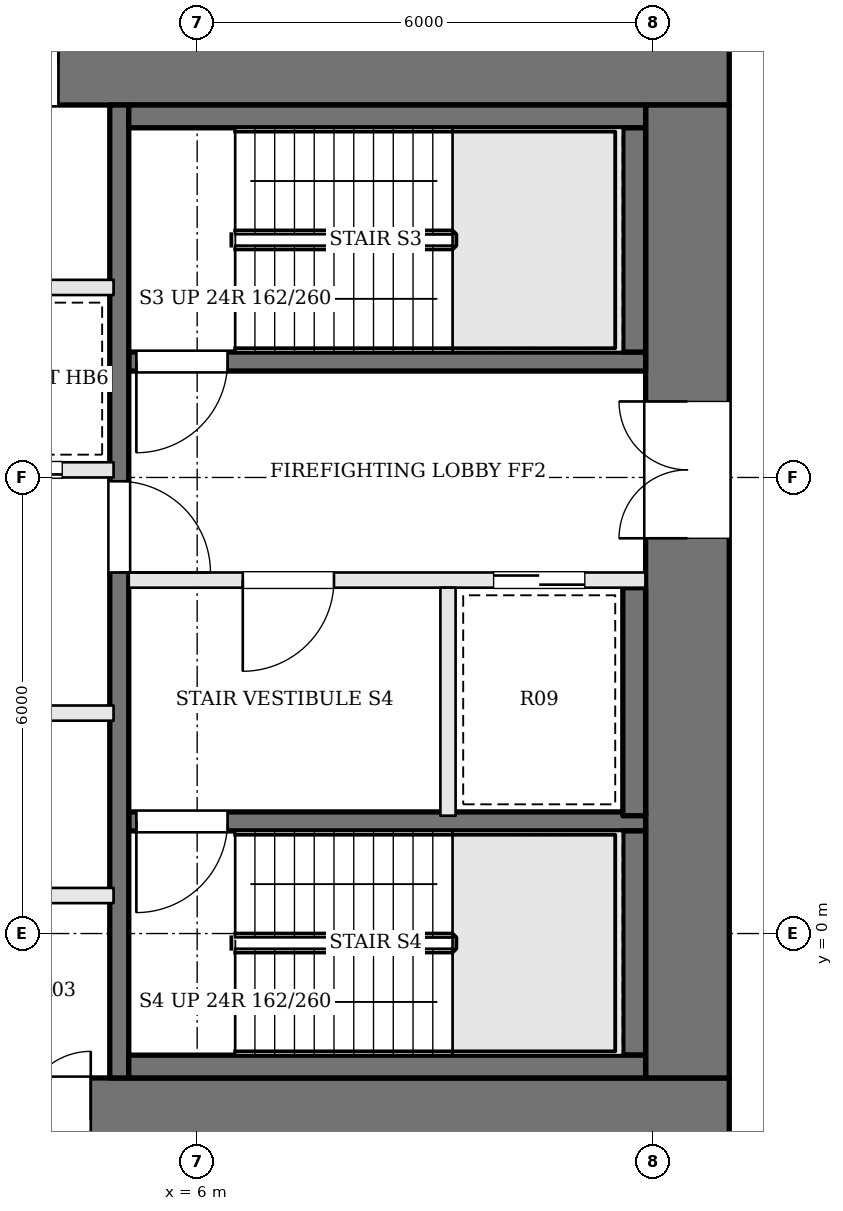
"""IFC4 building model, lengths in metres.
Left out: names, types, materials, properties, quantities, classifications, styles, units other than length and angle.
Written with IfcOpenShell. Run it as: python <this file> out.ifc"""

import sys

from ifc_helpers import new_model, si_unit, direction, frame, frame_2d, origin, place, context, subcontext, project, spatial, rectangle, extrude, element, fill, save


model = new_model("IFC4")
c1 = context("Model", 3, precision=1e-05, world=origin(), true_north=direction((0.0, 1.0)))
c2 = subcontext(c1, "Body", "Model", "MODEL_VIEW")
j1 = project(units=[si_unit("LENGTHUNIT", "METRE"), si_unit("PLANEANGLEUNIT", "RADIAN")], contexts=[c1])
p1 = place(None, origin())
s1 = spatial("IfcSite", under=j1, at=p1, CompositionType="ELEMENT")
p2 = place(p1, origin())
s2 = spatial("IfcBuilding", under=s1, at=p2, CompositionType="ELEMENT")
p3 = place(p2, frame((0.0, 0.0, 142.2)))
s3 = spatial("IfcBuildingStorey", under=s2, at=p3, CompositionType="ELEMENT", Elevation=142.2)
p4 = place(p3, frame((-13.0, 11.45, 0.0), z_axis=(0.0, 0.0, 1.0), x_axis=(1.0, 0.0, 0.0)))
e1 = element("IfcWall", 1, at=p4, inside=s3, PredefinedType="SHEAR", context=c2, shape_type="SweptSolid", body=[
    extrude(rectangle(XDim=26.0, YDim=1.1, at=frame_2d((13.0, 0.0))), origin(), (0.0, 0.0, 1.0), 3.9),
])
p5 = place(p4, frame((8.975, 0.0, 0.0)))
e2 = element("IfcOpeningElement", 2, at=p5, cuts=e1, PredefinedType="OPENING", context=c2, shape_type="SweptSolid", body=[
    extrude(rectangle(XDim=0.7, YDim=2.1, at=frame_2d((0.35, 1.05))), frame((0.0, 0.56, 0.0), z_axis=(0.0, -1.0, 0.0), x_axis=(1.0, 0.0, 0.0)), (0.0, 0.0, 1.0), 1.12),
])
p6 = place(p4, frame((11.425, 0.0, 0.0)))
e3 = element("IfcOpeningElement", 3, at=p6, cuts=e1, PredefinedType="OPENING", context=c2, shape_type="SweptSolid", body=[
    extrude(rectangle(XDim=0.7, YDim=2.1, at=frame_2d((0.35, 1.05))), frame((0.0, 0.56, 0.0), z_axis=(0.0, -1.0, 0.0), x_axis=(1.0, 0.0, 0.0)), (0.0, 0.0, 1.0), 1.12),
])
p7 = place(p4, frame((13.725, 0.0, 0.0)))
e4 = element("IfcOpeningElement", 4, at=p7, cuts=e1, PredefinedType="OPENING", context=c2, shape_type="SweptSolid", body=[
    extrude(rectangle(XDim=1.0, YDim=2.1, at=frame_2d((0.5, 1.05))), frame((0.0, 0.56, 0.0), z_axis=(0.0, -1.0, 0.0), x_axis=(1.0, 0.0, 0.0)), (0.0, 0.0, 1.0), 1.12),
])
p8 = place(p4, frame((16.175, 0.0, 0.0)))
e5 = element("IfcOpeningElement", 5, at=p8, cuts=e1, PredefinedType="OPENING", context=c2, shape_type="SweptSolid", body=[
    extrude(rectangle(XDim=1.0, YDim=2.1, at=frame_2d((0.5, 1.05))), frame((0.0, 0.56, 0.0), z_axis=(0.0, -1.0, 0.0), x_axis=(1.0, 0.0, 0.0)), (0.0, 0.0, 1.0), 1.12),
])
p9 = place(p3, frame((-13.0, -2.45, 0.0), z_axis=(0.0, 0.0, 1.0), x_axis=(1.0, 0.0, 0.0)))
e6 = element("IfcWall", 6, at=p9, inside=s3, PredefinedType="SHEAR", context=c2, shape_type="SweptSolid", body=[
    extrude(rectangle(XDim=26.0, YDim=1.1, at=frame_2d((13.0, 0.0))), origin(), (0.0, 0.0, 1.0), 3.9),
])
p10 = place(p9, frame((9.275, 0.0, 0.0)))
e7 = element("IfcOpeningElement", 7, at=p10, cuts=e6, PredefinedType="OPENING", context=c2, shape_type="SweptSolid", body=[
    extrude(rectangle(XDim=0.9, YDim=2.1, at=frame_2d((0.45, 1.05))), frame((0.0, 0.56, 0.0), z_axis=(0.0, -1.0, 0.0), x_axis=(1.0, 0.0, 0.0)), (0.0, 0.0, 1.0), 1.12),
])
p11 = place(p9, frame((11.75, 0.0, 0.0)))
e8 = element("IfcOpeningElement", 8, at=p11, cuts=e6, PredefinedType="OPENING", context=c2, shape_type="SweptSolid", body=[
    extrude(rectangle(XDim=1.0, YDim=2.1, at=frame_2d((0.5, 1.05))), frame((0.0, 0.56, 0.0), z_axis=(0.0, -1.0, 0.0), x_axis=(1.0, 0.0, 0.0)), (0.0, 0.0, 1.0), 1.12),
])
p12 = place(p9, frame((14.325, 0.0, 0.0)))
e9 = element("IfcOpeningElement", 9, at=p12, cuts=e6, PredefinedType="OPENING", context=c2, shape_type="SweptSolid", body=[
    extrude(rectangle(XDim=0.9, YDim=2.1, at=frame_2d((0.45, 1.05))), frame((0.0, 0.56, 0.0), z_axis=(0.0, -1.0, 0.0), x_axis=(1.0, 0.0, 0.0)), (0.0, 0.0, 1.0), 1.12),
])
p13 = place(p9, frame((16.7, 0.0, 0.0)))
e10 = element("IfcOpeningElement", 10, at=p13, cuts=e6, PredefinedType="OPENING", context=c2, shape_type="SweptSolid", body=[
    extrude(rectangle(XDim=0.9, YDim=2.1, at=frame_2d((0.45, 1.05))), frame((0.0, 0.56, 0.0), z_axis=(0.0, -1.0, 0.0), x_axis=(1.0, 0.0, 0.0)), (0.0, 0.0, 1.0), 1.12),
])
p14 = place(p3, frame((12.45, -1.9, 0.0), z_axis=(0.0, 0.0, 1.0), x_axis=(0.0, 1.0, 0.0)))
e11 = element("IfcWall", 11, at=p14, inside=s3, PredefinedType="SHEAR", context=c2, shape_type="SweptSolid", body=[
    extrude(rectangle(XDim=12.8, YDim=1.1, at=frame_2d((6.4, 0.0))), origin(), (0.0, 0.0, 1.0), 3.9),
])
p15 = place(p14, frame((7.1, 0.0, 0.0)))
e12 = element("IfcOpeningElement", 12, at=p15, cuts=e11, PredefinedType="OPENING", context=c2, shape_type="SweptSolid", body=[
    extrude(rectangle(XDim=1.8, YDim=2.1, at=frame_2d((0.9, 1.05))), frame((0.0, 0.56, 0.0), z_axis=(0.0, -1.0, 0.0), x_axis=(1.0, 0.0, 0.0)), (0.0, 0.0, 1.0), 1.12),
])
p16 = place(p3, frame((11.9, 7.525, 0.0), z_axis=(0.0, 0.0, 1.0), x_axis=(-1.0, 0.0, 0.0)))
e13 = element("IfcWall", 13, at=p16, inside=s3, PredefinedType="SOLIDWALL", context=c2, shape_type="SweptSolid", body=[
    extrude(rectangle(XDim=6.8, YDim=0.25, at=frame_2d((3.4, 0.0))), origin(), (0.0, 0.0, 1.0), 3.7),
])
p17 = place(p16, frame((5.5, 0.0, 0.0)))
e14 = element("IfcOpeningElement", 14, at=p17, cuts=e13, PredefinedType="OPENING", context=c2, shape_type="SweptSolid", body=[
    extrude(rectangle(XDim=1.2, YDim=2.1, at=frame_2d((0.6, 1.05))), frame((0.0, 0.135, 0.0), z_axis=(0.0, -1.0, 0.0), x_axis=(1.0, 0.0, 0.0)), (0.0, 0.0, 1.0), 0.27),
])
p18 = place(p3, frame((11.9, 4.65, 0.0), z_axis=(0.0, 0.0, 1.0), x_axis=(-1.0, 0.0, 0.0)))
e15 = element("IfcWall", 15, at=p18, inside=s3, PredefinedType="SOLIDWALL", context=c2, shape_type="SweptSolid", body=[
    extrude(rectangle(XDim=6.8, YDim=0.2, at=frame_2d((3.4, 0.0))), origin(), (0.0, 0.0, 1.0), 3.7),
])
p19 = place(p18, frame((4.1, 0.0, 0.0)))
e16 = element("IfcOpeningElement", 16, at=p19, cuts=e15, PredefinedType="OPENING", context=c2, shape_type="SweptSolid", body=[
    extrude(rectangle(XDim=1.2, YDim=2.1, at=frame_2d((0.6, 1.05))), frame((0.0, 0.11, 0.0), z_axis=(0.0, -1.0, 0.0), x_axis=(1.0, 0.0, 0.0)), (0.0, 0.0, 1.0), 0.22),
])
p20 = place(p18, frame((0.8, 0.0, 0.0)))
e17 = element("IfcOpeningElement", 17, at=p20, cuts=e15, PredefinedType="OPENING", context=c2, shape_type="SweptSolid", body=[
    extrude(rectangle(XDim=1.2, YDim=2.1, at=frame_2d((0.6, 1.05))), frame((0.0, 0.11, 0.0), z_axis=(0.0, -1.0, 0.0), x_axis=(1.0, 0.0, 0.0)), (0.0, 0.0, 1.0), 0.22),
])
p21 = place(p3, frame((11.9, 1.475, 0.0), z_axis=(0.0, 0.0, 1.0), x_axis=(-1.0, 0.0, 0.0)))
e18 = element("IfcWall", 18, at=p21, inside=s3, PredefinedType="SOLIDWALL", context=c2, shape_type="SweptSolid", body=[
    extrude(rectangle(XDim=6.8, YDim=0.25, at=frame_2d((3.4, 0.0))), origin(), (0.0, 0.0, 1.0), 3.7),
])
p22 = place(p21, frame((5.5, 0.0, 0.0)))
e19 = element("IfcOpeningElement", 19, at=p22, cuts=e18, PredefinedType="OPENING", context=c2, shape_type="SweptSolid", body=[
    extrude(rectangle(XDim=1.2, YDim=2.1, at=frame_2d((0.6, 1.05))), frame((0.0, 0.135, 0.0), z_axis=(0.0, -1.0, 0.0), x_axis=(1.0, 0.0, 0.0)), (0.0, 0.0, 1.0), 0.27),
])
p23 = place(p3, frame((9.3, 4.55, 0.0), z_axis=(0.0, 0.0, 1.0), x_axis=(0.0, -1.0, 0.0)))
e20 = element("IfcWall", 20, at=p23, inside=s3, PredefinedType="SOLIDWALL", context=c2, shape_type="SweptSolid", body=[
    extrude(rectangle(XDim=3.0, YDim=0.2, at=frame_2d((1.5, 0.0))), origin(), (0.0, 0.0, 1.0), 3.7),
])
p24 = place(p3, frame((4.975, 10.9, 0.0), z_axis=(0.0, 0.0, 1.0), x_axis=(0.0, -1.0, 0.0)))
e21 = element("IfcWall", 21, at=p24, inside=s3, PredefinedType="SOLIDWALL", context=c2, shape_type="SweptSolid", body=[
    extrude(rectangle(XDim=12.8, YDim=0.25, at=frame_2d((6.4, 0.0))), origin(), (0.0, 0.0, 1.0), 3.7),
])
p25 = place(p24, frame((4.95, 0.0, 0.0)))
e22 = element("IfcOpeningElement", 22, at=p25, cuts=e21, PredefinedType="OPENING", context=c2, shape_type="SweptSolid", body=[
    extrude(rectangle(XDim=1.2, YDim=2.1, at=frame_2d((0.6, 1.05))), frame((0.0, 0.135, 0.0), z_axis=(0.0, -1.0, 0.0), x_axis=(1.0, 0.0, 0.0)), (0.0, 0.0, 1.0), 0.27),
])
p26 = place(p3, frame((11.9, 10.75, 0.0), z_axis=(0.0, 0.0, 1.0), x_axis=(-1.0, 0.0, 0.0)))
e23 = element("IfcWall", 23, at=p26, inside=s3, PredefinedType="SOLIDWALL", context=c2, shape_type="SweptSolid", body=[
    extrude(rectangle(XDim=6.8, YDim=0.3, at=frame_2d((3.4, 0.0))), origin(), (0.0, 0.0, 1.0), 3.7),
])
p27 = place(p3, frame((11.75, 10.6, 0.0), z_axis=(0.0, 0.0, 1.0), x_axis=(0.0, -1.0, 0.0)))
e24 = element("IfcWall", 24, at=p27, inside=s3, PredefinedType="SOLIDWALL", context=c2, shape_type="SweptSolid", body=[
    extrude(rectangle(XDim=2.95, YDim=0.3, at=frame_2d((1.475, 0.0))), origin(), (0.0, 0.0, 1.0), 3.7),
])
p28 = place(p3, frame((11.75, 4.55, 0.0), z_axis=(0.0, 0.0, 1.0), x_axis=(0.0, -1.0, 0.0)))
e25 = element("IfcWall", 25, at=p28, inside=s3, PredefinedType="SOLIDWALL", context=c2, shape_type="SweptSolid", body=[
    extrude(rectangle(XDim=3.0, YDim=0.3, at=frame_2d((1.5, 0.0))), origin(), (0.0, 0.0, 1.0), 3.7),
])
p29 = place(p3, frame((11.75, 1.35, 0.0), z_axis=(0.0, 0.0, 1.0), x_axis=(0.0, -1.0, 0.0)))
e26 = element("IfcWall", 26, at=p29, inside=s3, PredefinedType="SOLIDWALL", context=c2, shape_type="SweptSolid", body=[
    extrude(rectangle(XDim=2.95, YDim=0.3, at=frame_2d((1.475, 0.0))), origin(), (0.0, 0.0, 1.0), 3.7),
])
p30 = place(p3, frame((11.9, -1.75, 0.0), z_axis=(0.0, 0.0, 1.0), x_axis=(-1.0, 0.0, 0.0)))
e27 = element("IfcWall", 27, at=p30, inside=s3, PredefinedType="SOLIDWALL", context=c2, shape_type="SweptSolid", body=[
    extrude(rectangle(XDim=6.8, YDim=0.3, at=frame_2d((3.4, 0.0))), origin(), (0.0, 0.0, 1.0), 3.7),
])
p31 = place(p3, frame((-4.9, 0.5, 0.0), z_axis=(0.0, 0.0, 1.0), x_axis=(1.0, 0.0, 0.0)))
e28 = element("IfcWall", 28, at=p31, inside=s3, PredefinedType="SOLIDWALL", context=c2, shape_type="SweptSolid", body=[
    extrude(rectangle(XDim=9.8, YDim=0.2, at=frame_2d((4.9, 0.0))), origin(), (0.0, 0.0, 1.0), 3.7),
])
p32 = place(p3, frame((-4.9, 2.9, 0.0), z_axis=(0.0, 0.0, 1.0), x_axis=(1.0, 0.0, 0.0)))
e29 = element("IfcWall", 29, at=p32, inside=s3, PredefinedType="SOLIDWALL", context=c2, shape_type="SweptSolid", body=[
    extrude(rectangle(XDim=9.8, YDim=0.2, at=frame_2d((4.9, 0.0))), origin(), (0.0, 0.0, 1.0), 3.7),
])
p33 = place(p32, frame((0.675, 0.0, 0.0)))
e30 = element("IfcOpeningElement", 30, at=p33, cuts=e29, PredefinedType="OPENING", context=c2, shape_type="SweptSolid", body=[
    extrude(rectangle(XDim=1.1, YDim=2.1, at=frame_2d((0.55, 1.05))), frame((0.0, 0.11, 0.0), z_axis=(0.0, -1.0, 0.0), x_axis=(1.0, 0.0, 0.0)), (0.0, 0.0, 1.0), 0.22),
])
p34 = place(p32, frame((2.613, 0.0, 0.0)))
e31 = element("IfcOpeningElement", 31, at=p34, cuts=e29, PredefinedType="OPENING", context=c2, shape_type="SweptSolid", body=[
    extrude(rectangle(XDim=0.9, YDim=2.1, at=frame_2d((0.45, 1.05))), frame((0.0, 0.11, 0.0), z_axis=(0.0, -1.0, 0.0), x_axis=(1.0, 0.0, 0.0)), (0.0, 0.0, 1.0), 0.22),
])
p35 = place(p32, frame((4.35, 0.0, 0.0)))
e32 = element("IfcOpeningElement", 32, at=p35, cuts=e29, PredefinedType="OPENING", context=c2, shape_type="SweptSolid", body=[
    extrude(rectangle(XDim=1.1, YDim=2.1, at=frame_2d((0.55, 1.05))), frame((0.0, 0.11, 0.0), z_axis=(0.0, -1.0, 0.0), x_axis=(1.0, 0.0, 0.0)), (0.0, 0.0, 1.0), 0.22),
])
p36 = place(p32, frame((7.463, 0.0, 0.0)))
e33 = element("IfcOpeningElement", 33, at=p36, cuts=e29, PredefinedType="OPENING", context=c2, shape_type="SweptSolid", body=[
    extrude(rectangle(XDim=1.0, YDim=2.1, at=frame_2d((0.5, 1.05))), frame((0.0, 0.11, 0.0), z_axis=(0.0, -1.0, 0.0), x_axis=(1.0, 0.0, 0.0)), (0.0, 0.0, 1.0), 0.22),
])
p37 = place(p3, frame((-4.9, 6.1, 0.0), z_axis=(0.0, 0.0, 1.0), x_axis=(1.0, 0.0, 0.0)))
e34 = element("IfcWall", 34, at=p37, inside=s3, PredefinedType="SOLIDWALL", context=c2, shape_type="SweptSolid", body=[
    extrude(rectangle(XDim=9.8, YDim=0.2, at=frame_2d((4.9, 0.0))), origin(), (0.0, 0.0, 1.0), 3.7),
])
p38 = place(p37, frame((0.675, 0.0, 0.0)))
e35 = element("IfcOpeningElement", 35, at=p38, cuts=e34, PredefinedType="OPENING", context=c2, shape_type="SweptSolid", body=[
    extrude(rectangle(XDim=1.1, YDim=2.1, at=frame_2d((0.55, 1.05))), frame((0.0, 0.11, 0.0), z_axis=(0.0, -1.0, 0.0), x_axis=(1.0, 0.0, 0.0)), (0.0, 0.0, 1.0), 0.22),
])
p39 = place(p37, frame((3.125, 0.0, 0.0)))
e36 = element("IfcOpeningElement", 36, at=p39, cuts=e34, PredefinedType="OPENING", context=c2, shape_type="SweptSolid", body=[
    extrude(rectangle(XDim=1.1, YDim=2.1, at=frame_2d((0.55, 1.05))), frame((0.0, 0.11, 0.0), z_axis=(0.0, -1.0, 0.0), x_axis=(1.0, 0.0, 0.0)), (0.0, 0.0, 1.0), 0.22),
])
p40 = place(p37, frame((5.575, 0.0, 0.0)))
e37 = element("IfcOpeningElement", 37, at=p40, cuts=e34, PredefinedType="OPENING", context=c2, shape_type="SweptSolid", body=[
    extrude(rectangle(XDim=1.1, YDim=2.1, at=frame_2d((0.55, 1.05))), frame((0.0, 0.11, 0.0), z_axis=(0.0, -1.0, 0.0), x_axis=(1.0, 0.0, 0.0)), (0.0, 0.0, 1.0), 0.22),
])
p41 = place(p37, frame((8.025, 0.0, 0.0)))
e38 = element("IfcOpeningElement", 38, at=p41, cuts=e34, PredefinedType="OPENING", context=c2, shape_type="SweptSolid", body=[
    extrude(rectangle(XDim=1.1, YDim=2.1, at=frame_2d((0.55, 1.05))), frame((0.0, 0.11, 0.0), z_axis=(0.0, -1.0, 0.0), x_axis=(1.0, 0.0, 0.0)), (0.0, 0.0, 1.0), 0.22),
])
p42 = place(p3, frame((-4.9, 8.5, 0.0), z_axis=(0.0, 0.0, 1.0), x_axis=(1.0, 0.0, 0.0)))
e39 = element("IfcWall", 39, at=p42, inside=s3, PredefinedType="SOLIDWALL", context=c2, shape_type="SweptSolid", body=[
    extrude(rectangle(XDim=9.8, YDim=0.2, at=frame_2d((4.9, 0.0))), origin(), (0.0, 0.0, 1.0), 3.7),
])
p43 = place(p15, origin())
e40 = element("IfcDoor", 40, at=p43, inside=s3, OperationType="DOUBLE_DOOR_SINGLE_SWING", PredefinedType="DOOR", context=c2, shape_type="SweptSolid", body=[
    extrude(rectangle(XDim=1.8, YDim=2.1, at=frame_2d((0.9, 1.05))), frame((0.0, 0.025, 0.0), z_axis=(0.0, -1.0, 0.0), x_axis=(1.0, 0.0, 0.0)), (0.0, 0.0, 1.0), 0.05),
])
fill(e12, e40)
p44 = place(p25, origin())
e41 = element("IfcDoor", 41, at=p44, inside=s3, OperationType="SINGLE_SWING_RIGHT", PredefinedType="DOOR", context=c2, shape_type="SweptSolid", body=[
    extrude(rectangle(XDim=1.2, YDim=2.1, at=frame_2d((0.6, 1.05))), frame((0.0, 0.025, 0.0), z_axis=(0.0, -1.0, 0.0), x_axis=(1.0, 0.0, 0.0)), (0.0, 0.0, 1.0), 0.05),
])
fill(e22, e41)
p45 = place(p19, origin())
e42 = element("IfcDoor", 42, at=p45, inside=s3, OperationType="SINGLE_SWING_RIGHT", PredefinedType="DOOR", context=c2, shape_type="SweptSolid", body=[
    extrude(rectangle(XDim=1.2, YDim=2.1, at=frame_2d((0.6, 1.05))), frame((0.0, 0.025, 0.0), z_axis=(0.0, -1.0, 0.0), x_axis=(1.0, 0.0, 0.0)), (0.0, 0.0, 1.0), 0.05),
])
fill(e16, e42)
p46 = place(p17, origin())
e43 = element("IfcDoor", 43, at=p46, inside=s3, OperationType="SINGLE_SWING_RIGHT", PredefinedType="DOOR", context=c2, shape_type="SweptSolid", body=[
    extrude(rectangle(XDim=1.2, YDim=2.1, at=frame_2d((0.6, 1.05))), frame((0.0, 0.025, 0.0), z_axis=(0.0, -1.0, 0.0), x_axis=(1.0, 0.0, 0.0)), (0.0, 0.0, 1.0), 0.05),
])
fill(e14, e43)
p47 = place(p22, origin())
e44 = element("IfcDoor", 44, at=p47, inside=s3, OperationType="SINGLE_SWING_RIGHT", PredefinedType="DOOR", context=c2, shape_type="SweptSolid", body=[
    extrude(rectangle(XDim=1.2, YDim=2.1, at=frame_2d((0.6, 1.05))), frame((0.0, 0.025, 0.0), z_axis=(0.0, -1.0, 0.0), x_axis=(1.0, 0.0, 0.0)), (0.0, 0.0, 1.0), 0.05),
])
fill(e19, e44)
p48 = place(p20, origin())
e45 = element("IfcDoor", 45, at=p48, inside=s3, OperationType="SLIDING_TO_RIGHT", PredefinedType="DOOR", context=c2, shape_type="SweptSolid", body=[
    extrude(rectangle(XDim=1.2, YDim=2.1, at=frame_2d((0.6, 1.05))), frame((0.0, 0.025, 0.0), z_axis=(0.0, -1.0, 0.0), x_axis=(1.0, 0.0, 0.0)), (0.0, 0.0, 1.0), 0.05),
])
fill(e17, e45)
p49 = place(p41, origin())
e46 = element("IfcDoor", 46, at=p49, inside=s3, OperationType="SLIDING_TO_LEFT", PredefinedType="DOOR", context=c2, shape_type="SweptSolid", body=[
    extrude(rectangle(XDim=1.1, YDim=2.1, at=frame_2d((0.55, 1.05))), frame((0.0, 0.025, 0.0), z_axis=(0.0, -1.0, 0.0), x_axis=(1.0, 0.0, 0.0)), (0.0, 0.0, 1.0), 0.05),
])
fill(e38, e46)
p50 = place(p13, origin())
e47 = element("IfcDoor", 47, at=p50, inside=s3, OperationType="SINGLE_SWING_RIGHT", PredefinedType="DOOR", context=c2, shape_type="SweptSolid", body=[
    extrude(rectangle(XDim=0.9, YDim=2.1, at=frame_2d((0.45, 1.05))), frame((0.0, 0.025, 0.0), z_axis=(0.0, -1.0, 0.0), x_axis=(1.0, 0.0, 0.0)), (0.0, 0.0, 1.0), 0.05),
])
fill(e10, e47)
p51 = place(p8, origin())
e48 = element("IfcDoor", 48, at=p51, inside=s3, OperationType="SINGLE_SWING_RIGHT", PredefinedType="DOOR", context=c2, shape_type="SweptSolid", body=[
    extrude(rectangle(XDim=1.0, YDim=2.1, at=frame_2d((0.5, 1.05))), frame((0.0, 0.025, 0.0), z_axis=(0.0, -1.0, 0.0), x_axis=(1.0, 0.0, 0.0)), (0.0, 0.0, 1.0), 0.05),
])
fill(e5, e48)
save(model, sys.argv[1])
